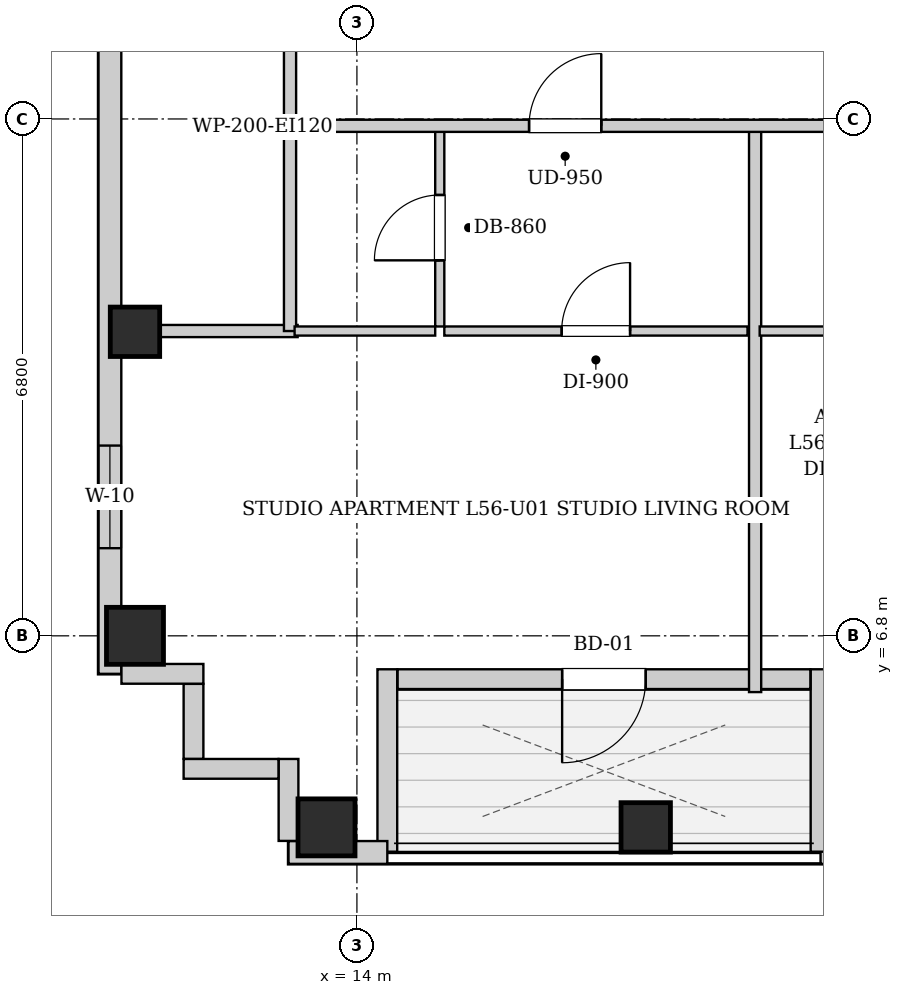
"""IFC4 building model, lengths in metres.
Left out: names, types, materials, properties, quantities, classifications, styles, units other than length and angle.
Written with IfcOpenShell. Run it as: python <this file> out.ifc"""

import sys

from ifc_helpers import new_model, si_unit, direction, frame, frame_2d, origin, origin_2d, place, context, subcontext, project, spatial, rectangle, extrude, element, fill, save


model = new_model("IFC4")
c1 = context("Model", 3, precision=1e-05, world=origin(), true_north=direction((0.0, 1.0)))
c2 = subcontext(c1, "Body", "Model", "MODEL_VIEW")
j1 = project(units=[si_unit("LENGTHUNIT", "METRE"), si_unit("PLANEANGLEUNIT", "RADIAN")], contexts=[c1])
p1 = place(None, origin())
s1 = spatial("IfcSite", under=j1, at=p1, CompositionType="ELEMENT")
p2 = place(p1, origin())
s2 = spatial("IfcBuilding", under=s1, at=p2, CompositionType="ELEMENT")
p3 = place(p2, frame((0.0, 0.0, 194.2)))
s3 = spatial("IfcBuildingStorey", under=s2, at=p3, CompositionType="ELEMENT", Elevation=194.2)
p4 = place(p3, frame((13.6, 4.28, 0.0), z_axis=(0.0, 0.0, 1.0), x_axis=(1.0, 0.0, 0.0)))
e1 = element("IfcColumn", 1, at=p4, inside=s3, PredefinedType="COLUMN", context=c2, shape_type="SweptSolid", body=[
    extrude(rectangle(XDim=0.75, YDim=0.75, at=origin_2d()), origin(), (0.0, 0.0, 1.0), 3.3),
])
p5 = place(p3, frame((17.8, 4.28, 0.0), z_axis=(0.0, 0.0, 1.0), x_axis=(1.0, 0.0, 0.0)))
e2 = element("IfcColumn", 2, at=p5, inside=s3, PredefinedType="COLUMN", context=c2, shape_type="SweptSolid", body=[
    extrude(rectangle(XDim=0.65, YDim=0.65, at=origin_2d()), origin(), (0.0, 0.0, 1.0), 3.3),
])
p6 = place(p3, frame((11.08, 6.8, 0.0), z_axis=(0.0, 0.0, 1.0), x_axis=(1.0, 0.0, 0.0)))
e3 = element("IfcColumn", 3, at=p6, inside=s3, PredefinedType="COLUMN", context=c2, shape_type="SweptSolid", body=[
    extrude(rectangle(XDim=0.75, YDim=0.75, at=origin_2d()), origin(), (0.0, 0.0, 1.0), 3.3),
])
p7 = place(p3, frame((11.08, 10.8, 0.0), z_axis=(0.0, 0.0, 1.0), x_axis=(1.0, 0.0, 0.0)))
e4 = element("IfcColumn", 4, at=p7, inside=s3, PredefinedType="COLUMN", context=c2, shape_type="SweptSolid", body=[
    extrude(rectangle(XDim=0.65, YDim=0.65, at=origin_2d()), origin(), (0.0, 0.0, 1.0), 3.3),
])
p8 = place(p3, frame((31.5, 3.95, 0.0), z_axis=(0.0, 0.0, 1.0), x_axis=(-1.0, 0.0, 0.0)))
e5 = element("IfcWall", 5, at=p8, inside=s3, PredefinedType="SOLIDWALL", context=c2, shape_type="SweptSolid", body=[
    extrude(rectangle(XDim=11.4, YDim=0.3, at=frame_2d((5.7, 0.0))), origin(), (0.0, 0.0, 1.0), 3.04),
])
p9 = place(p8, frame((9.45, 0.0, 0.55)))
e6 = element("IfcOpeningElement", 6, at=p9, cuts=e5, PredefinedType="OPENING", context=c2, shape_type="SweptSolid", body=[
    extrude(rectangle(XDim=1.35, YDim=1.2, at=frame_2d((0.675, 0.6))), frame((0.0, 0.16, 0.0), z_axis=(0.0, -1.0, 0.0), x_axis=(1.0, 0.0, 0.0)), (0.0, 0.0, 1.0), 0.32),
])
p10 = place(p8, frame((3.15, 0.0, 0.55)))
e7 = element("IfcOpeningElement", 7, at=p10, cuts=e5, PredefinedType="OPENING", context=c2, shape_type="SweptSolid", body=[
    extrude(rectangle(XDim=0.85, YDim=1.2, at=frame_2d((0.425, 0.6))), frame((0.0, 0.16, 0.0), z_axis=(0.0, -1.0, 0.0), x_axis=(1.0, 0.0, 0.0)), (0.0, 0.0, 1.0), 0.32),
])
p11 = place(p8, frame((0.75, 0.0, 0.55)))
e8 = element("IfcOpeningElement", 8, at=p11, cuts=e5, PredefinedType="OPENING", context=c2, shape_type="SweptSolid", body=[
    extrude(rectangle(XDim=1.35, YDim=1.2, at=frame_2d((0.675, 0.6))), frame((0.0, 0.16, 0.0), z_axis=(0.0, -1.0, 0.0), x_axis=(1.0, 0.0, 0.0)), (0.0, 0.0, 1.0), 0.32),
])
p12 = place(p3, frame((20.1, 3.96, 0.0), z_axis=(0.0, 0.0, 1.0), x_axis=(0.0, 1.0, 0.0)))
e9 = element("IfcWall", 9, at=p12, inside=s3, PredefinedType="SOLIDWALL", context=c2, shape_type="SweptSolid", body=[
    extrude(rectangle(XDim=2.4, YDim=0.26, at=frame_2d((1.2, 0.0))), origin(), (0.0, 0.0, 1.0), 3.04),
])
p13 = place(p3, frame((19.966, 6.23, 0.0), z_axis=(0.0, 0.0, 1.0), x_axis=(-1.0, 0.0, 0.0)))
e10 = element("IfcWall", 10, at=p13, inside=s3, PredefinedType="SOLIDWALL", context=c2, shape_type="SweptSolid", body=[
    extrude(rectangle(XDim=5.432, YDim=0.26, at=frame_2d((2.716, 0.0))), origin(), (0.0, 0.0, 1.0), 3.04),
])
p14 = place(p13, frame((2.166, 0.0, 0.0)))
e11 = element("IfcOpeningElement", 11, at=p14, cuts=e10, PredefinedType="OPENING", context=c2, shape_type="SweptSolid", body=[
    extrude(rectangle(XDim=1.1, YDim=2.0, at=frame_2d((0.55, 1.0))), frame((0.0, 0.14, 0.0), z_axis=(0.0, -1.0, 0.0), x_axis=(1.0, 0.0, 0.0)), (0.0, 0.0, 1.0), 0.28),
])
p15 = place(p3, frame((14.4, 6.36, 0.0), z_axis=(0.0, 0.0, 1.0), x_axis=(0.0, -1.0, 0.0)))
e12 = element("IfcWall", 12, at=p15, inside=s3, PredefinedType="SOLIDWALL", context=c2, shape_type="SweptSolid", body=[
    extrude(rectangle(XDim=2.4, YDim=0.26, at=frame_2d((1.2, 0.0))), origin(), (0.0, 0.0, 1.0), 3.04),
])
p16 = place(p3, frame((14.4, 3.95, 0.0), z_axis=(0.0, 0.0, 1.0), x_axis=(-1.0, 0.0, 0.0)))
e13 = element("IfcWall", 13, at=p16, inside=s3, PredefinedType="SOLIDWALL", context=c2, shape_type="SweptSolid", body=[
    extrude(rectangle(XDim=1.3, YDim=0.3, at=frame_2d((0.65, 0.0))), origin(), (0.0, 0.0, 1.0), 3.04),
])
p17 = place(p3, frame((10.75, 6.3, 0.0), z_axis=(0.0, 0.0, 1.0), x_axis=(0.0, 1.0, 0.0)))
e14 = element("IfcWall", 14, at=p17, inside=s3, PredefinedType="SOLIDWALL", context=c2, shape_type="SweptSolid", body=[
    extrude(rectangle(XDim=31.4, YDim=0.3, at=frame_2d((15.7, 0.0))), origin(), (0.0, 0.0, 1.0), 3.04),
])
p18 = place(p17, frame((1.653, 0.0, 0.55)))
e15 = element("IfcOpeningElement", 15, at=p18, cuts=e14, PredefinedType="OPENING", context=c2, shape_type="SweptSolid", body=[
    extrude(rectangle(XDim=1.35, YDim=1.2, at=frame_2d((0.675, 0.6))), frame((0.0, 0.16, 0.0), z_axis=(0.0, -1.0, 0.0), x_axis=(1.0, 0.0, 0.0)), (0.0, 0.0, 1.0), 0.32),
])
p19 = place(p17, frame((28.396, 0.0, 0.55)))
e16 = element("IfcOpeningElement", 16, at=p19, cuts=e14, PredefinedType="OPENING", context=c2, shape_type="SweptSolid", body=[
    extrude(rectangle(XDim=1.35, YDim=1.2, at=frame_2d((0.675, 0.6))), frame((0.0, 0.16, 0.0), z_axis=(0.0, -1.0, 0.0), x_axis=(1.0, 0.0, 0.0)), (0.0, 0.0, 1.0), 0.32),
])
p20 = place(p17, frame((10.367, 0.0, 0.55)))
e17 = element("IfcOpeningElement", 17, at=p20, cuts=e14, PredefinedType="OPENING", context=c2, shape_type="SweptSolid", body=[
    extrude(rectangle(XDim=1.35, YDim=1.2, at=frame_2d((0.675, 0.6))), frame((0.0, 0.16, 0.0), z_axis=(0.0, -1.0, 0.0), x_axis=(1.0, 0.0, 0.0)), (0.0, 0.0, 1.0), 0.32),
])
p21 = place(p17, frame((19.683, 0.0, 0.55)))
e18 = element("IfcOpeningElement", 18, at=p21, cuts=e14, PredefinedType="OPENING", context=c2, shape_type="SweptSolid", body=[
    extrude(rectangle(XDim=1.35, YDim=1.2, at=frame_2d((0.675, 0.6))), frame((0.0, 0.16, 0.0), z_axis=(0.0, -1.0, 0.0), x_axis=(1.0, 0.0, 0.0)), (0.0, 0.0, 1.0), 0.32),
])
p22 = place(p3, frame((13.1, 4.102, 0.0), z_axis=(0.0, 0.0, 1.0), x_axis=(0.0, 1.0, 0.0)))
e19 = element("IfcWall", 19, at=p22, inside=s3, PredefinedType="SOLIDWALL", context=c2, shape_type="SweptSolid", body=[
    extrude(rectangle(XDim=1.078, YDim=0.26, at=frame_2d((0.539, 0.0))), origin(), (0.0, 0.0, 1.0), 3.04),
])
p23 = place(p3, frame((12.968, 5.05, 0.0), z_axis=(0.0, 0.0, 1.0), x_axis=(-1.0, 0.0, 0.0)))
e20 = element("IfcWall", 20, at=p23, inside=s3, PredefinedType="SOLIDWALL", context=c2, shape_type="SweptSolid", body=[
    extrude(rectangle(XDim=1.248, YDim=0.26, at=frame_2d((0.624, 0.0))), origin(), (0.0, 0.0, 1.0), 3.04),
])
p24 = place(p3, frame((11.85, 5.182, 0.0), z_axis=(0.0, 0.0, 1.0), x_axis=(0.0, 1.0, 0.0)))
e21 = element("IfcWall", 21, at=p24, inside=s3, PredefinedType="SOLIDWALL", context=c2, shape_type="SweptSolid", body=[
    extrude(rectangle(XDim=0.986, YDim=0.26, at=frame_2d((0.493, 0.0))), origin(), (0.0, 0.0, 1.0), 3.04),
])
p25 = place(p3, frame((11.98, 6.3, 0.0), z_axis=(0.0, 0.0, 1.0), x_axis=(-1.0, 0.0, 0.0)))
e22 = element("IfcWall", 22, at=p25, inside=s3, PredefinedType="SOLIDWALL", context=c2, shape_type="SweptSolid", body=[
    extrude(rectangle(XDim=1.078, YDim=0.26, at=frame_2d((0.539, 0.0))), origin(), (0.0, 0.0, 1.0), 3.04),
])
p26 = place(p3, frame((13.12, 13.51, 0.0), z_axis=(0.0, 0.0, 1.0), x_axis=(0.0, 1.0, 0.0)))
e23 = element("IfcWall", 23, at=p26, inside=s3, PredefinedType="PARTITIONING", context=c2, shape_type="SweptSolid", body=[
    extrude(rectangle(XDim=1.58, YDim=0.16, at=frame_2d((0.79, 0.0))), origin(), (0.0, 0.0, 1.0), 3.04),
])
p27 = place(p3, frame((10.88, 10.81, 0.0), z_axis=(0.0, 0.0, 1.0), x_axis=(1.0, 0.0, 0.0)))
e24 = element("IfcWall", 24, at=p27, inside=s3, PredefinedType="PARTITIONING", context=c2, shape_type="SweptSolid", body=[
    extrude(rectangle(XDim=2.34, YDim=0.16, at=frame_2d((1.17, 0.0))), origin(), (0.0, 0.0, 1.0), 3.04),
])
p28 = place(p3, frame((13.12, 10.81, 0.0), z_axis=(0.0, 0.0, 1.0), x_axis=(0.0, 1.0, 0.0)))
e25 = element("IfcWall", 25, at=p28, inside=s3, PredefinedType="PARTITIONING", context=c2, shape_type="SweptSolid", body=[
    extrude(rectangle(XDim=2.66, YDim=0.16, at=frame_2d((1.33, 0.0))), origin(), (0.0, 0.0, 1.0), 3.04),
])
p29 = place(p3, frame((15.09, 10.87, 0.0), z_axis=(0.0, 0.0, 1.0), x_axis=(0.0, 1.0, 0.0)))
e26 = element("IfcWall", 26, at=p29, inside=s3, PredefinedType="PARTITIONING", context=c2, shape_type="SweptSolid", body=[
    extrude(rectangle(XDim=2.6, YDim=0.12, at=frame_2d((1.3, 0.0))), origin(), (0.0, 0.0, 1.0), 3.04),
])
p30 = place(p29, frame((0.87, 0.0, 0.0)))
e27 = element("IfcOpeningElement", 27, at=p30, cuts=e26, PredefinedType="OPENING", context=c2, shape_type="SweptSolid", body=[
    extrude(rectangle(XDim=0.86, YDim=2.05, at=frame_2d((0.43, 1.025))), frame((0.0, 0.07, 0.0), z_axis=(0.0, -1.0, 0.0), x_axis=(1.0, 0.0, 0.0)), (0.0, 0.0, 1.0), 0.14),
])
p31 = place(p3, frame((13.18, 10.81, 0.0), z_axis=(0.0, 0.0, 1.0), x_axis=(1.0, 0.0, 0.0)))
e28 = element("IfcWall", 28, at=p31, inside=s3, PredefinedType="PARTITIONING", context=c2, shape_type="SweptSolid", body=[
    extrude(rectangle(XDim=1.85, YDim=0.12, at=frame_2d((0.925, 0.0))), origin(), (0.0, 0.0, 1.0), 3.04),
])
p32 = place(p3, frame((15.15, 10.81, 0.0), z_axis=(0.0, 0.0, 1.0), x_axis=(1.0, 0.0, 0.0)))
e29 = element("IfcWall", 29, at=p32, inside=s3, PredefinedType="PARTITIONING", context=c2, shape_type="SweptSolid", body=[
    extrude(rectangle(XDim=3.989, YDim=0.12, at=frame_2d((1.995, 0.0))), origin(), (0.0, 0.0, 1.0), 3.04),
])
p33 = place(p32, frame((1.544, 0.0, 0.0)))
e30 = element("IfcOpeningElement", 30, at=p33, cuts=e29, PredefinedType="OPENING", context=c2, shape_type="SweptSolid", body=[
    extrude(rectangle(XDim=0.9, YDim=2.05, at=frame_2d((0.45, 1.025))), frame((0.0, 0.07, 0.0), z_axis=(0.0, -1.0, 0.0), x_axis=(1.0, 0.0, 0.0)), (0.0, 0.0, 1.0), 0.14),
])
p34 = place(p3, frame((19.239, 6.06, 0.0), z_axis=(0.0, 0.0, 1.0), x_axis=(0.0, 1.0, 0.0)))
e31 = element("IfcWall", 31, at=p34, inside=s3, PredefinedType="PARTITIONING", context=c2, shape_type="SweptSolid", body=[
    extrude(rectangle(XDim=7.41, YDim=0.16, at=frame_2d((3.705, 0.0))), origin(), (0.0, 0.0, 1.0), 3.04),
])
p35 = place(p3, frame((19.299, 10.81, 0.0), z_axis=(0.0, 0.0, 1.0), x_axis=(1.0, 0.0, 0.0)))
e32 = element("IfcWall", 32, at=p35, inside=s3, PredefinedType="PARTITIONING", context=c2, shape_type="SweptSolid", body=[
    extrude(rectangle(XDim=2.4, YDim=0.12, at=frame_2d((1.2, 0.0))), origin(), (0.0, 0.0, 1.0), 3.04),
])
p36 = place(p3, frame((13.15, 13.51, 0.0), z_axis=(0.0, 0.0, 1.0), x_axis=(1.0, 0.0, 0.0)))
e33 = element("IfcWall", 33, at=p36, inside=s3, PredefinedType="PARTITIONING", context=c2, shape_type="SweptSolid", body=[
    extrude(rectangle(XDim=24.6, YDim=0.16, at=frame_2d((12.3, 0.0))), origin(), (0.0, 0.0, 1.0), 3.04),
])
p37 = place(p36, frame((3.115, 0.0, 0.0)))
e34 = element("IfcOpeningElement", 34, at=p37, cuts=e33, PredefinedType="OPENING", context=c2, shape_type="SweptSolid", body=[
    extrude(rectangle(XDim=0.95, YDim=2.1, at=frame_2d((0.475, 1.05))), frame((0.0, 0.09, 0.0), z_axis=(0.0, -1.0, 0.0), x_axis=(1.0, 0.0, 0.0)), (0.0, 0.0, 1.0), 0.18),
])
p38 = place(p36, frame((10.414, 0.0, 0.0)))
e35 = element("IfcOpeningElement", 35, at=p38, cuts=e33, PredefinedType="OPENING", context=c2, shape_type="SweptSolid", body=[
    extrude(rectangle(XDim=0.95, YDim=2.1, at=frame_2d((0.475, 1.05))), frame((0.0, 0.09, 0.0), z_axis=(0.0, -1.0, 0.0), x_axis=(1.0, 0.0, 0.0)), (0.0, 0.0, 1.0), 0.18),
])
p39 = place(p30, origin())
e36 = element("IfcDoor", 36, at=p39, inside=s3, OperationType="SINGLE_SWING_LEFT", PredefinedType="DOOR", context=c2, shape_type="SweptSolid", body=[
    extrude(rectangle(XDim=0.86, YDim=2.05, at=frame_2d((0.43, 1.025))), frame((0.0, 0.025, 0.0), z_axis=(0.0, -1.0, 0.0), x_axis=(1.0, 0.0, 0.0)), (0.0, 0.0, 1.0), 0.05),
])
fill(e27, e36)
p40 = place(p33, origin())
e37 = element("IfcDoor", 37, at=p40, inside=s3, OperationType="SINGLE_SWING_RIGHT", PredefinedType="DOOR", context=c2, shape_type="SweptSolid", body=[
    extrude(rectangle(XDim=0.9, YDim=2.05, at=frame_2d((0.45, 1.025))), frame((0.0, 0.025, 0.0), z_axis=(0.0, -1.0, 0.0), x_axis=(1.0, 0.0, 0.0)), (0.0, 0.0, 1.0), 0.05),
])
fill(e30, e37)
p41 = place(p37, origin())
e38 = element("IfcDoor", 38, at=p41, inside=s3, OperationType="SINGLE_SWING_RIGHT", PredefinedType="DOOR", context=c2, shape_type="SweptSolid", body=[
    extrude(rectangle(XDim=0.95, YDim=2.1, at=frame_2d((0.475, 1.05))), frame((0.0, 0.025, 0.0), z_axis=(0.0, -1.0, 0.0), x_axis=(1.0, 0.0, 0.0)), (0.0, 0.0, 1.0), 0.05),
])
fill(e34, e38)
p42 = place(p14, origin())
e39 = element("IfcDoor", 39, at=p42, inside=s3, OperationType="SINGLE_SWING_RIGHT", PredefinedType="DOOR", context=c2, shape_type="SweptSolid", body=[
    extrude(rectangle(XDim=1.1, YDim=2.0, at=frame_2d((0.55, 1.0))), frame((0.0, 0.025, 0.0), z_axis=(0.0, -1.0, 0.0), x_axis=(1.0, 0.0, 0.0)), (0.0, 0.0, 1.0), 0.05),
])
fill(e11, e39)
p43 = place(p18, origin())
e40 = element("IfcWindow", 40, at=p43, inside=s3, PartitioningType="SINGLE_PANEL", PredefinedType="WINDOW", context=c2, shape_type="SweptSolid", body=[
    extrude(rectangle(XDim=1.35, YDim=1.2, at=frame_2d((0.675, 0.6))), frame((0.0, 0.03, 0.0), z_axis=(0.0, -1.0, 0.0), x_axis=(1.0, 0.0, 0.0)), (0.0, 0.0, 1.0), 0.06),
])
fill(e15, e40)
save(model, sys.argv[1])
